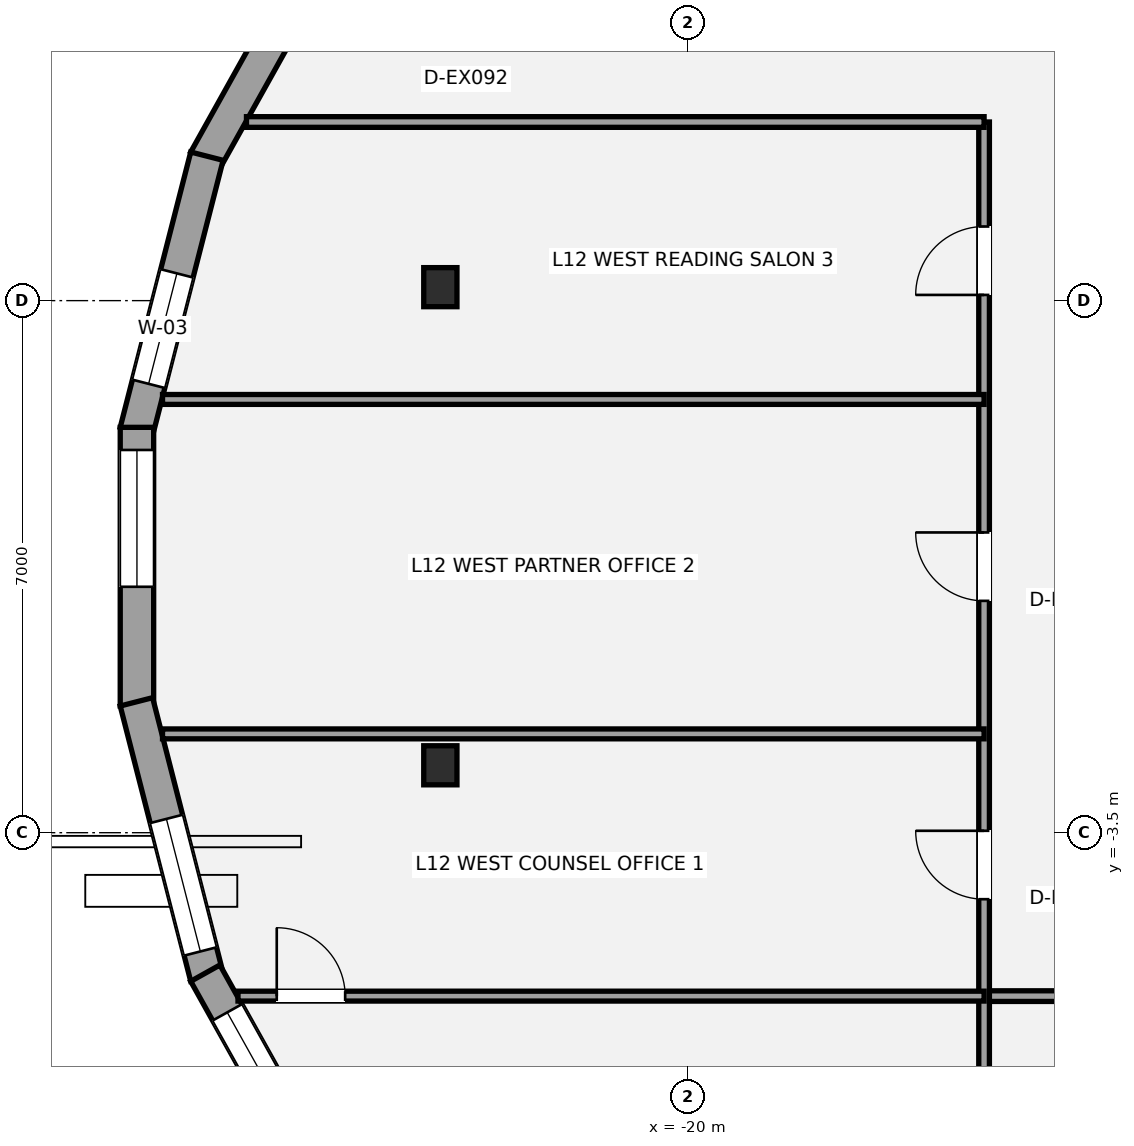
"""IFC4 building model, lengths in metres.
Left out: names, types, materials, properties, quantities, classifications, styles, units other than length and angle.
Written with IfcOpenShell. Run it as: python <this file> out.ifc"""

import sys

from ifc_helpers import new_model, si_unit, direction, frame, frame_2d, origin, origin_2d, place, context, subcontext, project, spatial, rectangle, i_section, extrude, element, fill, save


model = new_model("IFC4")
c1 = context("Model", 3, precision=1e-05, world=origin(), true_north=direction((0.0, 1.0)))
c2 = subcontext(c1, "Body", "Model", "MODEL_VIEW")
j1 = project(units=[si_unit("LENGTHUNIT", "METRE"), si_unit("PLANEANGLEUNIT", "RADIAN")], contexts=[c1])
p1 = place(None, origin())
s1 = spatial("IfcSite", under=j1, at=p1, CompositionType="ELEMENT")
p2 = place(p1, origin())
s2 = spatial("IfcBuilding", under=s1, at=p2, CompositionType="ELEMENT")
p3 = place(p2, frame((0.0, 0.0, 48.6)))
s3 = spatial("IfcBuildingStorey", under=s2, at=p3, CompositionType="ELEMENT", Elevation=48.6)
for number, where, z_axis, x_axis in (
    (1, (-23.254, 3.677, 0.0), (0.0, 0.0, 1.0), (1.0, 0.0, 0.0)),
    (2, (-23.254, -2.613, 0.0), (0.0, 0.0, 1.0), (1.0, 0.0, 0.0)),
):
    element("IfcColumn", number, at=place(p3, frame(where, z_axis=z_axis, x_axis=x_axis)), inside=s3, PredefinedType="COLUMN", context=c2, shape_type="SweptSolid", body=[
        extrude(i_section(OverallWidth=0.437, OverallDepth=0.514, WebThickness=0.061, FlangeThickness=0.097, at=origin_2d()), origin(), (0.0, 0.0, 1.0), 3.6),
    ])
p4 = place(p3, frame((-26.346, 5.348, 0.0), z_axis=(0.0, 0.0, 1.0), x_axis=(0.487369438963, 0.873195871477, 0.0)))
e3 = element("IfcWall", 3, at=p4, inside=s3, PredefinedType="STANDARD", context=c2, shape_type="SweptSolid", body=[
    extrude(rectangle(XDim=3.96, YDim=0.44, at=frame_2d((1.98, 0.0))), origin(), (0.0, 0.0, 1.0), 2.529),
])
p5 = place(p4, frame((2.761, 0.0, 0.58)))
e4 = element("IfcOpeningElement", 4, at=p5, cuts=e3, PredefinedType="OPENING", context=c2, shape_type="SweptSolid", body=[
    extrude(rectangle(XDim=0.9, YDim=1.35, at=frame_2d((0.45, 0.675))), frame((0.0, 0.23, 0.0), z_axis=(0.0, -1.0, 0.0), x_axis=(1.0, 0.0, 0.0)), (0.0, 0.0, 1.0), 0.46),
])
p6 = place(p3, frame((-27.253, 1.778, 0.0), z_axis=(0.0, 0.0, 1.0), x_axis=(0.248062710061, 0.968743976434, 0.0)))
e5 = element("IfcWall", 5, at=p6, inside=s3, PredefinedType="STANDARD", context=c2, shape_type="SweptSolid", body=[
    extrude(rectangle(XDim=3.739, YDim=0.44, at=frame_2d((1.87, 0.0))), origin(), (0.0, 0.0, 1.0), 2.529),
])
p7 = place(p6, frame((0.647, 0.0, 0.65)))
e6 = element("IfcOpeningElement", 6, at=p7, cuts=e5, PredefinedType="OPENING", context=c2, shape_type="SweptSolid", body=[
    extrude(rectangle(XDim=1.5, YDim=1.7, at=frame_2d((0.75, 0.85))), frame((0.0, 0.23, 0.0), z_axis=(0.0, -1.0, 0.0), x_axis=(1.0, 0.0, 0.0)), (0.0, 0.0, 1.0), 0.46),
])
p8 = place(p3, frame((-27.246, -1.833, 0.0), z_axis=(0.0, 0.0, 1.0), x_axis=(0.0, 1.0, 0.0)))
e7 = element("IfcWall", 7, at=p8, inside=s3, PredefinedType="STANDARD", context=c2, shape_type="SweptSolid", body=[
    extrude(rectangle(XDim=3.666, YDim=0.44, at=frame_2d((1.833, 0.0))), origin(), (0.0, 0.0, 1.0), 2.529),
])
p9 = place(p8, frame((1.568, 0.0, 0.65)))
e8 = element("IfcOpeningElement", 8, at=p9, cuts=e7, PredefinedType="OPENING", context=c2, shape_type="SweptSolid", body=[
    extrude(rectangle(XDim=1.8, YDim=1.7, at=frame_2d((0.9, 0.85))), frame((0.0, 0.23, 0.0), z_axis=(0.0, -1.0, 0.0), x_axis=(1.0, 0.0, 0.0)), (0.0, 0.0, 1.0), 0.46),
])
p10 = place(p3, frame((-26.325, -5.4, 0.0), z_axis=(0.0, 0.0, 1.0), x_axis=(-0.248062710061, 0.968743976434, 0.0)))
e9 = element("IfcWall", 9, at=p10, inside=s3, PredefinedType="STANDARD", context=c2, shape_type="SweptSolid", body=[
    extrude(rectangle(XDim=3.739, YDim=0.44, at=frame_2d((1.87, 0.0))), origin(), (0.0, 0.0, 1.0), 2.529),
])
p11 = place(p10, frame((0.349, 0.0, 0.65)))
e10 = element("IfcOpeningElement", 10, at=p11, cuts=e9, PredefinedType="OPENING", context=c2, shape_type="SweptSolid", body=[
    extrude(rectangle(XDim=1.8, YDim=1.7, at=frame_2d((0.9, 0.85))), frame((0.0, 0.23, 0.0), z_axis=(0.0, -1.0, 0.0), x_axis=(1.0, 0.0, 0.0)), (0.0, 0.0, 1.0), 0.46),
])
p12 = place(p3, frame((-24.416, -8.806, 0.0), z_axis=(0.0, 0.0, 1.0), x_axis=(-0.487369438963, 0.873195871477, 0.0)))
e11 = element("IfcWall", 11, at=p12, inside=s3, PredefinedType="STANDARD", context=c2, shape_type="SweptSolid", body=[
    extrude(rectangle(XDim=3.96, YDim=0.44, at=frame_2d((1.98, 0.0))), origin(), (0.0, 0.0, 1.0), 2.529),
])
p13 = place(p12, frame((1.569, 0.0, 0.48)))
e12 = element("IfcOpeningElement", 12, at=p13, cuts=e11, PredefinedType="OPENING", context=c2, shape_type="SweptSolid", body=[
    extrude(rectangle(XDim=1.8, YDim=1.7, at=frame_2d((0.9, 0.85))), frame((0.0, 0.23, 0.0), z_axis=(0.0, -1.0, 0.0), x_axis=(1.0, 0.0, 0.0)), (0.0, 0.0, 1.0), 0.46),
])
p14 = place(p3, frame((-16.1, -5.65, 0.0), z_axis=(0.0, 0.0, 1.0), x_axis=(1.0, 0.0, 0.0)))
e13 = element("IfcWall", 13, at=p14, inside=s3, PredefinedType="PARTITIONING", context=c2, shape_type="SweptSolid", body=[
    extrude(rectangle(XDim=34.1, YDim=0.14, at=frame_2d((17.05, 0.0))), origin(), (0.0, 0.0, 1.0), 2.853),
])
p15 = place(p14, frame((5.35, 0.0, 0.0)))
e14 = element("IfcOpeningElement", 14, at=p15, cuts=e13, PredefinedType="OPENING", context=c2, shape_type="SweptSolid", body=[
    extrude(rectangle(XDim=0.9, YDim=2.1, at=frame_2d((0.45, 1.05))), frame((0.0, 0.08, 0.0), z_axis=(0.0, -1.0, 0.0), x_axis=(1.0, 0.0, 0.0)), (0.0, 0.0, 1.0), 0.16),
])
p16 = place(p14, frame((15.85, 0.0, 0.0)))
e15 = element("IfcOpeningElement", 15, at=p16, cuts=e13, PredefinedType="OPENING", context=c2, shape_type="SweptSolid", body=[
    extrude(rectangle(XDim=1.5, YDim=2.15, at=frame_2d((0.75, 1.075))), frame((0.0, 0.08, 0.0), z_axis=(0.0, -1.0, 0.0), x_axis=(1.0, 0.0, 0.0)), (0.0, 0.0, 1.0), 0.16),
])
p17 = place(p14, frame((27.4, 0.0, 0.0)))
e16 = element("IfcOpeningElement", 16, at=p17, cuts=e13, PredefinedType="OPENING", context=c2, shape_type="SweptSolid", body=[
    extrude(rectangle(XDim=0.9, YDim=2.1, at=frame_2d((0.45, 1.05))), frame((0.0, 0.08, 0.0), z_axis=(0.0, -1.0, 0.0), x_axis=(1.0, 0.0, 0.0)), (0.0, 0.0, 1.0), 0.16),
])
p18 = place(p3, frame((-16.1, -14.922, 0.0), z_axis=(0.0, 0.0, 1.0), x_axis=(0.0, 1.0, 0.0)))
e17 = element("IfcWall", 17, at=p18, inside=s3, PredefinedType="PARTITIONING", context=c2, shape_type="SweptSolid", body=[
    extrude(rectangle(XDim=20.772, YDim=0.14, at=frame_2d((10.386, 0.0))), origin(), (0.0, 0.0, 1.0), 2.841),
])
p19 = place(p18, frame((10.547, 0.0, 0.0)))
e18 = element("IfcOpeningElement", 18, at=p19, cuts=e17, PredefinedType="OPENING", context=c2, shape_type="SweptSolid", body=[
    extrude(rectangle(XDim=0.9, YDim=2.1, at=frame_2d((0.45, 1.05))), frame((0.0, 0.08, 0.0), z_axis=(0.0, -1.0, 0.0), x_axis=(1.0, 0.0, 0.0)), (0.0, 0.0, 1.0), 0.16),
])
p20 = place(p18, frame((14.472, 0.0, 0.0)))
e19 = element("IfcOpeningElement", 19, at=p20, cuts=e17, PredefinedType="OPENING", context=c2, shape_type="SweptSolid", body=[
    extrude(rectangle(XDim=0.9, YDim=2.1, at=frame_2d((0.45, 1.05))), frame((0.0, 0.08, 0.0), z_axis=(0.0, -1.0, 0.0), x_axis=(1.0, 0.0, 0.0)), (0.0, 0.0, 1.0), 0.16),
])
p21 = place(p18, frame((18.497, 0.0, 0.0)))
e20 = element("IfcOpeningElement", 20, at=p21, cuts=e17, PredefinedType="OPENING", context=c2, shape_type="SweptSolid", body=[
    extrude(rectangle(XDim=0.9, YDim=2.1, at=frame_2d((0.45, 1.05))), frame((0.0, 0.08, 0.0), z_axis=(0.0, -1.0, 0.0), x_axis=(1.0, 0.0, 0.0)), (0.0, 0.0, 1.0), 0.16),
])
p22 = place(p3, frame((-25.805, 5.85, 0.0), z_axis=(0.0, 0.0, 1.0), x_axis=(1.0, 0.0, 0.0)))
e21 = element("IfcWall", 21, at=p22, inside=s3, PredefinedType="PARTITIONING", context=c2, shape_type="SweptSolid", body=[
    extrude(rectangle(XDim=9.705, YDim=0.14, at=frame_2d((4.852, 0.0))), origin(), (0.0, 0.0, 1.0), 2.853),
])
p23 = place(p3, frame((-25.917, -5.65, 0.0), z_axis=(0.0, 0.0, 1.0), x_axis=(1.0, 0.0, 0.0)))
e22 = element("IfcWall", 22, at=p23, inside=s3, PredefinedType="PARTITIONING", context=c2, shape_type="SweptSolid", body=[
    extrude(rectangle(XDim=9.816, YDim=0.13, at=frame_2d((4.908, 0.0))), origin(), (0.0, 0.0, 1.0), 2.779),
])
p24 = place(p23, frame((0.51, 0.0, 0.0)))
e23 = element("IfcOpeningElement", 23, at=p24, cuts=e22, PredefinedType="OPENING", context=c2, shape_type="SweptSolid", body=[
    extrude(rectangle(XDim=0.9, YDim=2.1, at=frame_2d((0.45, 1.05))), frame((0.0, 0.075, 0.0), z_axis=(0.0, -1.0, 0.0), x_axis=(1.0, 0.0, 0.0)), (0.0, 0.0, 1.0), 0.15),
])
for number, where, z_axis, x_axis in (
    (24, (-26.909, -2.2, 0.0), (0.0, 0.0, 1.0), (1.0, 0.0, 0.0)),
    (25, (-26.909, 2.2, 0.0), (0.0, 0.0, 1.0), (1.0, 0.0, 0.0)),
):
    element("IfcWall", number, at=place(p3, frame(where, z_axis=z_axis, x_axis=x_axis)), inside=s3, PredefinedType="PARTITIONING", context=c2, shape_type="SweptSolid", body=[
        extrude(rectangle(XDim=10.809, YDim=0.13, at=frame_2d((5.405, 0.0))), origin(), (0.0, 0.0, 1.0), 2.841),
    ])
p25 = place(p7, origin())
e26 = element("IfcWindow", 26, at=p25, inside=s3, PartitioningType="SINGLE_PANEL", PredefinedType="WINDOW", context=c2, shape_type="SweptSolid", body=[
    extrude(rectangle(XDim=1.5, YDim=1.7, at=frame_2d((0.75, 0.85))), frame((0.0, -0.01, 0.0), z_axis=(0.0, -1.0, 0.0), x_axis=(1.0, 0.0, 0.0)), (0.0, 0.0, 1.0), 0.06),
])
fill(e6, e26)
p26 = place(p9, origin())
e27 = element("IfcWindow", 27, at=p26, inside=s3, PartitioningType="SINGLE_PANEL", PredefinedType="WINDOW", context=c2, shape_type="SweptSolid", body=[
    extrude(rectangle(XDim=1.8, YDim=1.7, at=frame_2d((0.9, 0.85))), frame((0.0, -0.01, 0.0), z_axis=(0.0, -1.0, 0.0), x_axis=(1.0, 0.0, 0.0)), (0.0, 0.0, 1.0), 0.06),
])
fill(e8, e27)
p27 = place(p11, origin())
e28 = element("IfcWindow", 28, at=p27, inside=s3, PartitioningType="SINGLE_PANEL", PredefinedType="WINDOW", context=c2, shape_type="SweptSolid", body=[
    extrude(rectangle(XDim=1.8, YDim=1.7, at=frame_2d((0.9, 0.85))), frame((0.0, -0.01, 0.0), z_axis=(0.0, -1.0, 0.0), x_axis=(1.0, 0.0, 0.0)), (0.0, 0.0, 1.0), 0.06),
])
fill(e10, e28)
p28 = place(p13, origin())
e29 = element("IfcWindow", 29, at=p28, inside=s3, PartitioningType="SINGLE_PANEL", PredefinedType="WINDOW", context=c2, shape_type="SweptSolid", body=[
    extrude(rectangle(XDim=1.8, YDim=1.7, at=frame_2d((0.9, 0.85))), frame((0.0, -0.01, 0.0), z_axis=(0.0, -1.0, 0.0), x_axis=(1.0, 0.0, 0.0)), (0.0, 0.0, 1.0), 0.06),
])
fill(e12, e29)
p29 = place(p24, origin())
e30 = element("IfcDoor", 30, at=p29, inside=s3, OperationType="SINGLE_SWING_LEFT", PredefinedType="DOOR", context=c2, shape_type="SweptSolid", body=[
    extrude(rectangle(XDim=0.9, YDim=2.1, at=frame_2d((0.45, 1.05))), frame((0.0, 0.025, 0.0), z_axis=(0.0, -1.0, 0.0), x_axis=(1.0, 0.0, 0.0)), (0.0, 0.0, 1.0), 0.05),
])
fill(e23, e30)
p30 = place(p19, origin())
e31 = element("IfcDoor", 31, at=p30, inside=s3, OperationType="SINGLE_SWING_RIGHT", PredefinedType="DOOR", context=c2, shape_type="SweptSolid", body=[
    extrude(rectangle(XDim=0.9, YDim=2.1, at=frame_2d((0.45, 1.05))), frame((0.0, 0.025, 0.0), z_axis=(0.0, -1.0, 0.0), x_axis=(1.0, 0.0, 0.0)), (0.0, 0.0, 1.0), 0.05),
])
fill(e18, e31)
p31 = place(p20, origin())
e32 = element("IfcDoor", 32, at=p31, inside=s3, OperationType="SINGLE_SWING_RIGHT", PredefinedType="DOOR", context=c2, shape_type="SweptSolid", body=[
    extrude(rectangle(XDim=0.9, YDim=2.1, at=frame_2d((0.45, 1.05))), frame((0.0, 0.025, 0.0), z_axis=(0.0, -1.0, 0.0), x_axis=(1.0, 0.0, 0.0)), (0.0, 0.0, 1.0), 0.05),
])
fill(e19, e32)
p32 = place(p21, origin())
e33 = element("IfcDoor", 33, at=p32, inside=s3, OperationType="SINGLE_SWING_LEFT", PredefinedType="DOOR", context=c2, shape_type="SweptSolid", body=[
    extrude(rectangle(XDim=0.9, YDim=2.1, at=frame_2d((0.45, 1.05))), frame((0.0, 0.025, 0.0), z_axis=(0.0, -1.0, 0.0), x_axis=(1.0, 0.0, 0.0)), (0.0, 0.0, 1.0), 0.05),
])
fill(e20, e33)
save(model, sys.argv[1])
